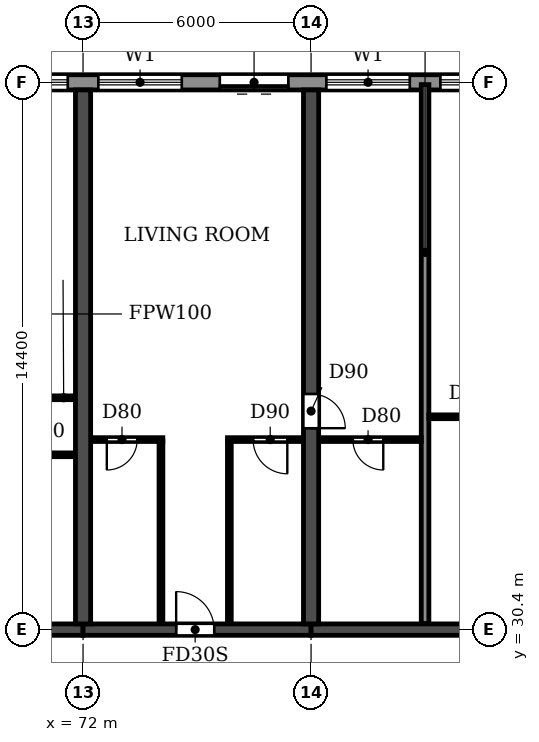
"""IFC4 building model, lengths in metres.
Left out: names, types, materials, properties, quantities, classifications, styles, units other than length and angle.
Written with IfcOpenShell. Run it as: python <this file> out.ifc"""

import sys

from ifc_helpers import new_model, si_unit, direction, frame, frame_2d, origin, place, context, subcontext, project, spatial, rectangle, extrude, element, fill, save


model = new_model("IFC4")
c1 = context("Model", 3, precision=1e-05, world=origin(), true_north=direction((0.0, 1.0)))
c2 = subcontext(c1, "Body", "Model", "MODEL_VIEW")
j1 = project(units=[si_unit("LENGTHUNIT", "METRE"), si_unit("PLANEANGLEUNIT", "RADIAN")], contexts=[c1])
p1 = place(None, origin())
s1 = spatial("IfcSite", under=j1, at=p1, CompositionType="ELEMENT")
p2 = place(p1, origin())
s2 = spatial("IfcBuilding", under=s1, at=p2, CompositionType="ELEMENT")
p3 = place(p2, frame((0.0, 0.0, 23.4)))
s3 = spatial("IfcBuildingStorey", under=s2, at=p3, CompositionType="ELEMENT", Elevation=23.4)
p4 = place(p3, frame((72.0, 30.55, 0.0), z_axis=(0.0, 0.0, 1.0), x_axis=(0.0, 1.0, 0.0)))
e1 = element("IfcWall", 1, at=p4, inside=s3, PredefinedType="SHEAR", context=c2, shape_type="SweptSolid", body=[
    extrude(rectangle(XDim=14.05, YDim=0.4, at=frame_2d((7.025, 0.0))), origin(), (0.0, 0.0, 1.0), 3.05),
])
p5 = place(p3, frame((78.0, 30.55, 0.0), z_axis=(0.0, 0.0, 1.0), x_axis=(0.0, 1.0, 0.0)))
e2 = element("IfcWall", 2, at=p5, inside=s3, PredefinedType="SHEAR", context=c2, shape_type="SweptSolid", body=[
    extrude(rectangle(XDim=14.05, YDim=0.4, at=frame_2d((7.025, 0.0))), origin(), (0.0, 0.0, 1.0), 3.05),
])
p6 = place(p5, frame((5.15, 0.0, 0.0)))
e3 = element("IfcOpeningElement", 3, at=p6, cuts=e2, PredefinedType="OPENING", context=c2, shape_type="SweptSolid", body=[
    extrude(rectangle(XDim=0.9, YDim=2.1, at=frame_2d((0.45, 1.05))), frame((0.0, 0.21, 0.0), z_axis=(0.0, -1.0, 0.0), x_axis=(1.0, 0.0, 0.0)), (0.0, 0.0, 1.0), 0.42),
])
p7 = place(p3, frame((66.0, 30.4, 0.0), z_axis=(0.0, 0.0, 1.0), x_axis=(1.0, 0.0, 0.0)))
e4 = element("IfcWall", 4, at=p7, inside=s3, PredefinedType="SHEAR", context=c2, shape_type="SweptSolid", body=[
    extrude(rectangle(XDim=6.0, YDim=0.3, at=frame_2d((3.0, 0.0))), origin(), (0.0, 0.0, 1.0), 2.45),
])
p8 = place(p3, frame((72.0, 30.4, 0.0), z_axis=(0.0, 0.0, 1.0), x_axis=(1.0, 0.0, 0.0)))
e5 = element("IfcWall", 5, at=p8, inside=s3, PredefinedType="SHEAR", context=c2, shape_type="SweptSolid", body=[
    extrude(rectangle(XDim=6.0, YDim=0.3, at=frame_2d((3.0, 0.0))), origin(), (0.0, 0.0, 1.0), 2.45),
])
p9 = place(p8, frame((2.45, 0.0, 0.0)))
e6 = element("IfcOpeningElement", 6, at=p9, cuts=e5, PredefinedType="OPENING", context=c2, shape_type="SweptSolid", body=[
    extrude(rectangle(XDim=1.0, YDim=2.1, at=frame_2d((0.5, 1.05))), frame((0.0, 0.16, 0.0), z_axis=(0.0, -1.0, 0.0), x_axis=(1.0, 0.0, 0.0)), (0.0, 0.0, 1.0), 0.32),
])
p10 = place(p3, frame((78.0, 30.4, 0.0), z_axis=(0.0, 0.0, 1.0), x_axis=(1.0, 0.0, 0.0)))
e7 = element("IfcWall", 7, at=p10, inside=s3, PredefinedType="SHEAR", context=c2, shape_type="SweptSolid", body=[
    extrude(rectangle(XDim=6.0, YDim=0.3, at=frame_2d((3.0, 0.0))), origin(), (0.0, 0.0, 1.0), 2.45),
])
p11 = place(p3, frame((97.317, 44.8, 0.0), z_axis=(0.0, 0.0, 1.0), x_axis=(-1.0, 0.0, 0.0)))
e8 = element("IfcWall", 8, at=p11, inside=s3, PredefinedType="STANDARD", context=c2, shape_type="SweptSolid", body=[
    extrude(rectangle(XDim=92.634, YDim=0.4, at=frame_2d((46.317, 0.0))), origin(), (0.0, 0.0, 1.0), 3.05),
])
p12 = place(p11, frame((88.717, 0.0, 0.9)))
e9 = element("IfcOpeningElement", 9, at=p12, cuts=e8, PredefinedType="OPENING", context=c2, shape_type="SweptSolid", body=[
    extrude(rectangle(XDim=2.2, YDim=1.5, at=frame_2d((1.1, 0.75))), frame((0.0, 0.21, 0.0), z_axis=(0.0, -1.0, 0.0), x_axis=(1.0, 0.0, 0.0)), (0.0, 0.0, 1.0), 0.42),
])
p13 = place(p11, frame((85.917, 0.0, 0.0)))
e10 = element("IfcOpeningElement", 10, at=p13, cuts=e8, PredefinedType="OPENING", context=c2, shape_type="SweptSolid", body=[
    extrude(rectangle(XDim=1.8, YDim=2.4, at=frame_2d((0.9, 1.2))), frame((0.0, 0.21, 0.0), z_axis=(0.0, -1.0, 0.0), x_axis=(1.0, 0.0, 0.0)), (0.0, 0.0, 1.0), 0.42),
])
p14 = place(p11, frame((82.717, 0.0, 0.9)))
e11 = element("IfcOpeningElement", 11, at=p14, cuts=e8, PredefinedType="OPENING", context=c2, shape_type="SweptSolid", body=[
    extrude(rectangle(XDim=2.2, YDim=1.5, at=frame_2d((1.1, 0.75))), frame((0.0, 0.21, 0.0), z_axis=(0.0, -1.0, 0.0), x_axis=(1.0, 0.0, 0.0)), (0.0, 0.0, 1.0), 0.42),
])
p15 = place(p11, frame((79.717, 0.0, 0.9)))
e12 = element("IfcOpeningElement", 12, at=p15, cuts=e8, PredefinedType="OPENING", context=c2, shape_type="SweptSolid", body=[
    extrude(rectangle(XDim=2.2, YDim=1.5, at=frame_2d((1.1, 0.75))), frame((0.0, 0.21, 0.0), z_axis=(0.0, -1.0, 0.0), x_axis=(1.0, 0.0, 0.0)), (0.0, 0.0, 1.0), 0.42),
])
p16 = place(p11, frame((76.917, 0.0, 0.0)))
e13 = element("IfcOpeningElement", 13, at=p16, cuts=e8, PredefinedType="OPENING", context=c2, shape_type="SweptSolid", body=[
    extrude(rectangle(XDim=1.8, YDim=2.4, at=frame_2d((0.9, 1.2))), frame((0.0, 0.21, 0.0), z_axis=(0.0, -1.0, 0.0), x_axis=(1.0, 0.0, 0.0)), (0.0, 0.0, 1.0), 0.42),
])
p17 = place(p11, frame((73.717, 0.0, 0.9)))
e14 = element("IfcOpeningElement", 14, at=p17, cuts=e8, PredefinedType="OPENING", context=c2, shape_type="SweptSolid", body=[
    extrude(rectangle(XDim=2.2, YDim=1.5, at=frame_2d((1.1, 0.75))), frame((0.0, 0.21, 0.0), z_axis=(0.0, -1.0, 0.0), x_axis=(1.0, 0.0, 0.0)), (0.0, 0.0, 1.0), 0.42),
])
p18 = place(p11, frame((70.717, 0.0, 0.9)))
e15 = element("IfcOpeningElement", 15, at=p18, cuts=e8, PredefinedType="OPENING", context=c2, shape_type="SweptSolid", body=[
    extrude(rectangle(XDim=2.2, YDim=1.5, at=frame_2d((1.1, 0.75))), frame((0.0, 0.21, 0.0), z_axis=(0.0, -1.0, 0.0), x_axis=(1.0, 0.0, 0.0)), (0.0, 0.0, 1.0), 0.42),
])
p19 = place(p11, frame((67.717, 0.0, 0.9)))
e16 = element("IfcOpeningElement", 16, at=p19, cuts=e8, PredefinedType="OPENING", context=c2, shape_type="SweptSolid", body=[
    extrude(rectangle(XDim=2.2, YDim=1.5, at=frame_2d((1.1, 0.75))), frame((0.0, 0.21, 0.0), z_axis=(0.0, -1.0, 0.0), x_axis=(1.0, 0.0, 0.0)), (0.0, 0.0, 1.0), 0.42),
])
p20 = place(p11, frame((64.917, 0.0, 0.0)))
e17 = element("IfcOpeningElement", 17, at=p20, cuts=e8, PredefinedType="OPENING", context=c2, shape_type="SweptSolid", body=[
    extrude(rectangle(XDim=1.8, YDim=2.4, at=frame_2d((0.9, 1.2))), frame((0.0, 0.21, 0.0), z_axis=(0.0, -1.0, 0.0), x_axis=(1.0, 0.0, 0.0)), (0.0, 0.0, 1.0), 0.42),
])
p21 = place(p11, frame((61.717, 0.0, 0.9)))
e18 = element("IfcOpeningElement", 18, at=p21, cuts=e8, PredefinedType="OPENING", context=c2, shape_type="SweptSolid", body=[
    extrude(rectangle(XDim=2.2, YDim=1.5, at=frame_2d((1.1, 0.75))), frame((0.0, 0.21, 0.0), z_axis=(0.0, -1.0, 0.0), x_axis=(1.0, 0.0, 0.0)), (0.0, 0.0, 1.0), 0.42),
])
p22 = place(p11, frame((58.717, 0.0, 0.9)))
e19 = element("IfcOpeningElement", 19, at=p22, cuts=e8, PredefinedType="OPENING", context=c2, shape_type="SweptSolid", body=[
    extrude(rectangle(XDim=2.2, YDim=1.5, at=frame_2d((1.1, 0.75))), frame((0.0, 0.21, 0.0), z_axis=(0.0, -1.0, 0.0), x_axis=(1.0, 0.0, 0.0)), (0.0, 0.0, 1.0), 0.42),
])
p23 = place(p11, frame((55.917, 0.0, 0.0)))
e20 = element("IfcOpeningElement", 20, at=p23, cuts=e8, PredefinedType="OPENING", context=c2, shape_type="SweptSolid", body=[
    extrude(rectangle(XDim=1.8, YDim=2.4, at=frame_2d((0.9, 1.2))), frame((0.0, 0.21, 0.0), z_axis=(0.0, -1.0, 0.0), x_axis=(1.0, 0.0, 0.0)), (0.0, 0.0, 1.0), 0.42),
])
p24 = place(p11, frame((52.917, 0.0, 0.0)))
e21 = element("IfcOpeningElement", 21, at=p24, cuts=e8, PredefinedType="OPENING", context=c2, shape_type="SweptSolid", body=[
    extrude(rectangle(XDim=1.8, YDim=2.4, at=frame_2d((0.9, 1.2))), frame((0.0, 0.21, 0.0), z_axis=(0.0, -1.0, 0.0), x_axis=(1.0, 0.0, 0.0)), (0.0, 0.0, 1.0), 0.42),
])
p25 = place(p11, frame((49.717, 0.0, 0.9)))
e22 = element("IfcOpeningElement", 22, at=p25, cuts=e8, PredefinedType="OPENING", context=c2, shape_type="SweptSolid", body=[
    extrude(rectangle(XDim=2.2, YDim=1.5, at=frame_2d((1.1, 0.75))), frame((0.0, 0.21, 0.0), z_axis=(0.0, -1.0, 0.0), x_axis=(1.0, 0.0, 0.0)), (0.0, 0.0, 1.0), 0.42),
])
p26 = place(p11, frame((46.917, 0.0, 0.0)))
e23 = element("IfcOpeningElement", 23, at=p26, cuts=e8, PredefinedType="OPENING", context=c2, shape_type="SweptSolid", body=[
    extrude(rectangle(XDim=1.8, YDim=2.4, at=frame_2d((0.9, 1.2))), frame((0.0, 0.21, 0.0), z_axis=(0.0, -1.0, 0.0), x_axis=(1.0, 0.0, 0.0)), (0.0, 0.0, 1.0), 0.42),
])
p27 = place(p11, frame((43.717, 0.0, 0.9)))
e24 = element("IfcOpeningElement", 24, at=p27, cuts=e8, PredefinedType="OPENING", context=c2, shape_type="SweptSolid", body=[
    extrude(rectangle(XDim=2.2, YDim=1.5, at=frame_2d((1.1, 0.75))), frame((0.0, 0.21, 0.0), z_axis=(0.0, -1.0, 0.0), x_axis=(1.0, 0.0, 0.0)), (0.0, 0.0, 1.0), 0.42),
])
p28 = place(p11, frame((40.717, 0.0, 0.9)))
e25 = element("IfcOpeningElement", 25, at=p28, cuts=e8, PredefinedType="OPENING", context=c2, shape_type="SweptSolid", body=[
    extrude(rectangle(XDim=2.2, YDim=1.5, at=frame_2d((1.1, 0.75))), frame((0.0, 0.21, 0.0), z_axis=(0.0, -1.0, 0.0), x_axis=(1.0, 0.0, 0.0)), (0.0, 0.0, 1.0), 0.42),
])
p29 = place(p11, frame((37.917, 0.0, 0.0)))
e26 = element("IfcOpeningElement", 26, at=p29, cuts=e8, PredefinedType="OPENING", context=c2, shape_type="SweptSolid", body=[
    extrude(rectangle(XDim=1.8, YDim=2.4, at=frame_2d((0.9, 1.2))), frame((0.0, 0.21, 0.0), z_axis=(0.0, -1.0, 0.0), x_axis=(1.0, 0.0, 0.0)), (0.0, 0.0, 1.0), 0.42),
])
p30 = place(p11, frame((34.917, 0.0, 0.0)))
e27 = element("IfcOpeningElement", 27, at=p30, cuts=e8, PredefinedType="OPENING", context=c2, shape_type="SweptSolid", body=[
    extrude(rectangle(XDim=1.8, YDim=2.4, at=frame_2d((0.9, 1.2))), frame((0.0, 0.21, 0.0), z_axis=(0.0, -1.0, 0.0), x_axis=(1.0, 0.0, 0.0)), (0.0, 0.0, 1.0), 0.42),
])
p31 = place(p11, frame((31.717, 0.0, 0.9)))
e28 = element("IfcOpeningElement", 28, at=p31, cuts=e8, PredefinedType="OPENING", context=c2, shape_type="SweptSolid", body=[
    extrude(rectangle(XDim=2.2, YDim=1.5, at=frame_2d((1.1, 0.75))), frame((0.0, 0.21, 0.0), z_axis=(0.0, -1.0, 0.0), x_axis=(1.0, 0.0, 0.0)), (0.0, 0.0, 1.0), 0.42),
])
p32 = place(p11, frame((28.717, 0.0, 0.9)))
e29 = element("IfcOpeningElement", 29, at=p32, cuts=e8, PredefinedType="OPENING", context=c2, shape_type="SweptSolid", body=[
    extrude(rectangle(XDim=2.2, YDim=1.5, at=frame_2d((1.1, 0.75))), frame((0.0, 0.21, 0.0), z_axis=(0.0, -1.0, 0.0), x_axis=(1.0, 0.0, 0.0)), (0.0, 0.0, 1.0), 0.42),
])
p33 = place(p11, frame((25.717, 0.0, 0.9)))
e30 = element("IfcOpeningElement", 30, at=p33, cuts=e8, PredefinedType="OPENING", context=c2, shape_type="SweptSolid", body=[
    extrude(rectangle(XDim=2.2, YDim=1.5, at=frame_2d((1.1, 0.75))), frame((0.0, 0.21, 0.0), z_axis=(0.0, -1.0, 0.0), x_axis=(1.0, 0.0, 0.0)), (0.0, 0.0, 1.0), 0.42),
])
p34 = place(p11, frame((22.717, 0.0, 0.9)))
e31 = element("IfcOpeningElement", 31, at=p34, cuts=e8, PredefinedType="OPENING", context=c2, shape_type="SweptSolid", body=[
    extrude(rectangle(XDim=2.2, YDim=1.5, at=frame_2d((1.1, 0.75))), frame((0.0, 0.21, 0.0), z_axis=(0.0, -1.0, 0.0), x_axis=(1.0, 0.0, 0.0)), (0.0, 0.0, 1.0), 0.42),
])
p35 = place(p11, frame((19.917, 0.0, 0.0)))
e32 = element("IfcOpeningElement", 32, at=p35, cuts=e8, PredefinedType="OPENING", context=c2, shape_type="SweptSolid", body=[
    extrude(rectangle(XDim=1.8, YDim=2.4, at=frame_2d((0.9, 1.2))), frame((0.0, 0.21, 0.0), z_axis=(0.0, -1.0, 0.0), x_axis=(1.0, 0.0, 0.0)), (0.0, 0.0, 1.0), 0.42),
])
p36 = place(p11, frame((16.717, 0.0, 0.9)))
e33 = element("IfcOpeningElement", 33, at=p36, cuts=e8, PredefinedType="OPENING", context=c2, shape_type="SweptSolid", body=[
    extrude(rectangle(XDim=2.2, YDim=1.5, at=frame_2d((1.1, 0.75))), frame((0.0, 0.21, 0.0), z_axis=(0.0, -1.0, 0.0), x_axis=(1.0, 0.0, 0.0)), (0.0, 0.0, 1.0), 0.42),
])
p37 = place(p11, frame((13.717, 0.0, 0.9)))
e34 = element("IfcOpeningElement", 34, at=p37, cuts=e8, PredefinedType="OPENING", context=c2, shape_type="SweptSolid", body=[
    extrude(rectangle(XDim=2.2, YDim=1.5, at=frame_2d((1.1, 0.75))), frame((0.0, 0.21, 0.0), z_axis=(0.0, -1.0, 0.0), x_axis=(1.0, 0.0, 0.0)), (0.0, 0.0, 1.0), 0.42),
])
p38 = place(p11, frame((10.717, 0.0, 0.9)))
e35 = element("IfcOpeningElement", 35, at=p38, cuts=e8, PredefinedType="OPENING", context=c2, shape_type="SweptSolid", body=[
    extrude(rectangle(XDim=2.2, YDim=1.5, at=frame_2d((1.1, 0.75))), frame((0.0, 0.21, 0.0), z_axis=(0.0, -1.0, 0.0), x_axis=(1.0, 0.0, 0.0)), (0.0, 0.0, 1.0), 0.42),
])
p39 = place(p11, frame((7.917, 0.0, 0.0)))
e36 = element("IfcOpeningElement", 36, at=p39, cuts=e8, PredefinedType="OPENING", context=c2, shape_type="SweptSolid", body=[
    extrude(rectangle(XDim=1.8, YDim=2.4, at=frame_2d((0.9, 1.2))), frame((0.0, 0.21, 0.0), z_axis=(0.0, -1.0, 0.0), x_axis=(1.0, 0.0, 0.0)), (0.0, 0.0, 1.0), 0.42),
])
p40 = place(p11, frame((4.917, 0.0, 0.0)))
e37 = element("IfcOpeningElement", 37, at=p40, cuts=e8, PredefinedType="OPENING", context=c2, shape_type="SweptSolid", body=[
    extrude(rectangle(XDim=1.8, YDim=2.4, at=frame_2d((0.9, 1.2))), frame((0.0, 0.21, 0.0), z_axis=(0.0, -1.0, 0.0), x_axis=(1.0, 0.0, 0.0)), (0.0, 0.0, 1.0), 0.42),
])
p41 = place(p11, frame((1.717, 0.0, 0.9)))
e38 = element("IfcOpeningElement", 38, at=p41, cuts=e8, PredefinedType="OPENING", context=c2, shape_type="SweptSolid", body=[
    extrude(rectangle(XDim=2.2, YDim=1.5, at=frame_2d((1.1, 0.75))), frame((0.0, 0.21, 0.0), z_axis=(0.0, -1.0, 0.0), x_axis=(1.0, 0.0, 0.0)), (0.0, 0.0, 1.0), 0.42),
])
p42 = place(p3, frame((81.0, 30.56, 0.0), z_axis=(0.0, 0.0, 1.0), x_axis=(0.0, 1.0, 0.0)))
e39 = element("IfcWall", 39, at=p42, inside=s3, PredefinedType="PARTITIONING", context=c2, shape_type="SweptSolid", body=[
    extrude(rectangle(XDim=14.18, YDim=0.2, at=frame_2d((7.09, 0.0))), origin(), (0.0, 0.0, 1.0), 3.05),
])
p43 = place(p3, frame((66.21, 35.0, 0.0), z_axis=(0.0, 0.0, 1.0), x_axis=(1.0, 0.0, 0.0)))
e40 = element("IfcWall", 40, at=p43, inside=s3, PredefinedType="PARTITIONING", context=c2, shape_type="SweptSolid", body=[
    extrude(rectangle(XDim=5.58, YDim=0.1, at=frame_2d((2.79, 0.0))), origin(), (0.0, 0.0, 1.0), 3.05),
])
p44 = place(p43, frame((1.04, 0.0, 0.0)))
e41 = element("IfcOpeningElement", 41, at=p44, cuts=e40, PredefinedType="OPENING", context=c2, shape_type="SweptSolid", body=[
    extrude(rectangle(XDim=0.8, YDim=2.1, at=frame_2d((0.4, 1.05))), frame((0.0, 0.06, 0.0), z_axis=(0.0, -1.0, 0.0), x_axis=(1.0, 0.0, 0.0)), (0.0, 0.0, 1.0), 0.12),
])
p45 = place(p43, frame((4.04, 0.0, 0.0)))
e42 = element("IfcOpeningElement", 42, at=p45, cuts=e40, PredefinedType="OPENING", context=c2, shape_type="SweptSolid", body=[
    extrude(rectangle(XDim=0.8, YDim=2.1, at=frame_2d((0.4, 1.05))), frame((0.0, 0.06, 0.0), z_axis=(0.0, -1.0, 0.0), x_axis=(1.0, 0.0, 0.0)), (0.0, 0.0, 1.0), 0.12),
])
p46 = place(p3, frame((72.21, 35.4, 0.0), z_axis=(0.0, 0.0, 1.0), x_axis=(1.0, 0.0, 0.0)))
e43 = element("IfcWall", 43, at=p46, inside=s3, PredefinedType="PARTITIONING", context=c2, shape_type="SweptSolid", body=[
    extrude(rectangle(XDim=1.89, YDim=0.1, at=frame_2d((0.945, 0.0))), origin(), (0.0, 0.0, 1.0), 3.05),
])
p47 = place(p46, frame((0.415, 0.0, 0.0)))
e44 = element("IfcOpeningElement", 44, at=p47, cuts=e43, PredefinedType="OPENING", context=c2, shape_type="SweptSolid", body=[
    extrude(rectangle(XDim=0.8, YDim=2.1, at=frame_2d((0.4, 1.05))), frame((0.0, 0.06, 0.0), z_axis=(0.0, -1.0, 0.0), x_axis=(1.0, 0.0, 0.0)), (0.0, 0.0, 1.0), 0.12),
])
p48 = place(p3, frame((75.8, 35.4, 0.0), z_axis=(0.0, 0.0, 1.0), x_axis=(1.0, 0.0, 0.0)))
e45 = element("IfcWall", 45, at=p48, inside=s3, PredefinedType="PARTITIONING", context=c2, shape_type="SweptSolid", body=[
    extrude(rectangle(XDim=1.99, YDim=0.1, at=frame_2d((0.995, 0.0))), origin(), (0.0, 0.0, 1.0), 3.05),
])
p49 = place(p48, frame((0.675, 0.0, 0.0)))
e46 = element("IfcOpeningElement", 46, at=p49, cuts=e45, PredefinedType="OPENING", context=c2, shape_type="SweptSolid", body=[
    extrude(rectangle(XDim=0.9, YDim=2.1, at=frame_2d((0.45, 1.05))), frame((0.0, 0.06, 0.0), z_axis=(0.0, -1.0, 0.0), x_axis=(1.0, 0.0, 0.0)), (0.0, 0.0, 1.0), 0.12),
])
p50 = place(p3, frame((78.21, 35.4, 0.0), z_axis=(0.0, 0.0, 1.0), x_axis=(1.0, 0.0, 0.0)))
e47 = element("IfcWall", 47, at=p50, inside=s3, PredefinedType="PARTITIONING", context=c2, shape_type="SweptSolid", body=[
    extrude(rectangle(XDim=2.69, YDim=0.1, at=frame_2d((1.345, 0.0))), origin(), (0.0, 0.0, 1.0), 3.05),
])
p51 = place(p50, frame((0.89, 0.0, 0.0)))
e48 = element("IfcOpeningElement", 48, at=p51, cuts=e47, PredefinedType="OPENING", context=c2, shape_type="SweptSolid", body=[
    extrude(rectangle(XDim=0.8, YDim=2.1, at=frame_2d((0.4, 1.05))), frame((0.0, 0.06, 0.0), z_axis=(0.0, -1.0, 0.0), x_axis=(1.0, 0.0, 0.0)), (0.0, 0.0, 1.0), 0.12),
])
p52 = place(p3, frame((81.1, 36.0, 0.0), z_axis=(0.0, 0.0, 1.0), x_axis=(1.0, 0.0, 0.0)))
e49 = element("IfcWall", 49, at=p52, inside=s3, PredefinedType="PARTITIONING", context=c2, shape_type="SweptSolid", body=[
    extrude(rectangle(XDim=2.69, YDim=0.1, at=frame_2d((1.345, 0.0))), origin(), (0.0, 0.0, 1.0), 3.05),
])
p53 = place(p52, frame((1.0, 0.0, 0.0)))
e50 = element("IfcOpeningElement", 50, at=p53, cuts=e49, PredefinedType="OPENING", context=c2, shape_type="SweptSolid", body=[
    extrude(rectangle(XDim=0.8, YDim=2.1, at=frame_2d((0.4, 1.05))), frame((0.0, 0.06, 0.0), z_axis=(0.0, -1.0, 0.0), x_axis=(1.0, 0.0, 0.0)), (0.0, 0.0, 1.0), 0.12),
])
p54 = place(p3, frame((66.21, 36.5, 0.0), z_axis=(0.0, 0.0, 1.0), x_axis=(1.0, 0.0, 0.0)))
e51 = element("IfcWall", 51, at=p54, inside=s3, PredefinedType="PARTITIONING", context=c2, shape_type="SweptSolid", body=[
    extrude(rectangle(XDim=5.58, YDim=0.1, at=frame_2d((2.79, 0.0))), origin(), (0.0, 0.0, 1.0), 3.05),
])
p55 = place(p54, frame((2.74, 0.0, 0.0)))
e52 = element("IfcOpeningElement", 52, at=p55, cuts=e51, PredefinedType="OPENING", context=c2, shape_type="SweptSolid", body=[
    extrude(rectangle(XDim=0.9, YDim=2.1, at=frame_2d((0.45, 1.05))), frame((0.0, 0.06, 0.0), z_axis=(0.0, -1.0, 0.0), x_axis=(1.0, 0.0, 0.0)), (0.0, 0.0, 1.0), 0.12),
])
for number, where, z_axis, x_axis in (
    (53, (74.05, 30.56, 0.0), (0.0, 0.0, 1.0), (0.0, 1.0, 0.0)),
    (54, (75.85, 30.56, 0.0), (0.0, 0.0, 1.0), (0.0, 1.0, 0.0)),
):
    element("IfcWall", number, at=place(p3, frame(where, z_axis=z_axis, x_axis=x_axis)), inside=s3, PredefinedType="PARTITIONING", context=c2, shape_type="SweptSolid", body=[
        extrude(rectangle(XDim=4.79, YDim=0.1, at=frame_2d((2.395, 0.0))), origin(), (0.0, 0.0, 1.0), 3.05),
    ])
p56 = place(p33, origin())
e55 = element("IfcWindow", 55, at=p56, inside=s3, PartitioningType="DOUBLE_PANEL_HORIZONTAL", PredefinedType="WINDOW", context=c2, shape_type="SweptSolid", body=[
    extrude(rectangle(XDim=2.2, YDim=1.5, at=frame_2d((1.1, 0.75))), frame((0.0, 0.03, 0.0), z_axis=(0.0, -1.0, 0.0), x_axis=(1.0, 0.0, 0.0)), (0.0, 0.0, 1.0), 0.06),
])
fill(e30, e55)
p57 = place(p34, origin())
e56 = element("IfcWindow", 56, at=p57, inside=s3, PartitioningType="DOUBLE_PANEL_HORIZONTAL", PredefinedType="WINDOW", context=c2, shape_type="SweptSolid", body=[
    extrude(rectangle(XDim=2.2, YDim=1.5, at=frame_2d((1.1, 0.75))), frame((0.0, 0.03, 0.0), z_axis=(0.0, -1.0, 0.0), x_axis=(1.0, 0.0, 0.0)), (0.0, 0.0, 1.0), 0.06),
])
fill(e31, e56)
p58 = place(p35, origin())
e57 = element("IfcDoor", 57, at=p58, inside=s3, OperationType="DOUBLE_DOOR_SLIDING", PredefinedType="DOOR", context=c2, shape_type="SweptSolid", body=[
    extrude(rectangle(XDim=1.8, YDim=2.4, at=frame_2d((0.9, 1.2))), frame((0.0, 0.025, 0.0), z_axis=(0.0, -1.0, 0.0), x_axis=(1.0, 0.0, 0.0)), (0.0, 0.0, 1.0), 0.05),
])
fill(e32, e57)
p59 = place(p36, origin())
e58 = element("IfcWindow", 58, at=p59, inside=s3, PartitioningType="DOUBLE_PANEL_HORIZONTAL", PredefinedType="WINDOW", context=c2, shape_type="SweptSolid", body=[
    extrude(rectangle(XDim=2.2, YDim=1.5, at=frame_2d((1.1, 0.75))), frame((0.0, 0.03, 0.0), z_axis=(0.0, -1.0, 0.0), x_axis=(1.0, 0.0, 0.0)), (0.0, 0.0, 1.0), 0.06),
])
fill(e33, e58)
p60 = place(p37, origin())
e59 = element("IfcWindow", 59, at=p60, inside=s3, PartitioningType="DOUBLE_PANEL_HORIZONTAL", PredefinedType="WINDOW", context=c2, shape_type="SweptSolid", body=[
    extrude(rectangle(XDim=2.2, YDim=1.5, at=frame_2d((1.1, 0.75))), frame((0.0, 0.03, 0.0), z_axis=(0.0, -1.0, 0.0), x_axis=(1.0, 0.0, 0.0)), (0.0, 0.0, 1.0), 0.06),
])
fill(e34, e59)
p61 = place(p51, frame((0.8, 0.0, 0.0), z_axis=(0.0, 0.0, 1.0), x_axis=(-1.0, 0.0, 0.0)))
e60 = element("IfcDoor", 60, at=p61, inside=s3, OperationType="SINGLE_SWING_LEFT", PredefinedType="DOOR", context=c2, shape_type="SweptSolid", body=[
    extrude(rectangle(XDim=0.8, YDim=2.1, at=frame_2d((0.4, 1.05))), frame((0.0, 0.025, 0.0), z_axis=(0.0, -1.0, 0.0), x_axis=(1.0, 0.0, 0.0)), (0.0, 0.0, 1.0), 0.05),
])
fill(e48, e60)
p62 = place(p47, frame((0.8, 0.0, 0.0), z_axis=(0.0, 0.0, 1.0), x_axis=(-1.0, 0.0, 0.0)))
e61 = element("IfcDoor", 61, at=p62, inside=s3, OperationType="SINGLE_SWING_RIGHT", PredefinedType="DOOR", context=c2, shape_type="SweptSolid", body=[
    extrude(rectangle(XDim=0.8, YDim=2.1, at=frame_2d((0.4, 1.05))), frame((0.0, 0.025, 0.0), z_axis=(0.0, -1.0, 0.0), x_axis=(1.0, 0.0, 0.0)), (0.0, 0.0, 1.0), 0.05),
])
fill(e44, e61)
p63 = place(p9, origin())
e62 = element("IfcDoor", 62, at=p63, inside=s3, OperationType="SINGLE_SWING_LEFT", PredefinedType="DOOR", context=c2, shape_type="SweptSolid", body=[
    extrude(rectangle(XDim=1.0, YDim=2.1, at=frame_2d((0.5, 1.05))), frame((0.0, 0.025, 0.0), z_axis=(0.0, -1.0, 0.0), x_axis=(1.0, 0.0, 0.0)), (0.0, 0.0, 1.0), 0.05),
])
fill(e6, e62)
p64 = place(p49, frame((0.9, 0.0, 0.0), z_axis=(0.0, 0.0, 1.0), x_axis=(-1.0, 0.0, 0.0)))
e63 = element("IfcDoor", 63, at=p64, inside=s3, OperationType="SINGLE_SWING_LEFT", PredefinedType="DOOR", context=c2, shape_type="SweptSolid", body=[
    extrude(rectangle(XDim=0.9, YDim=2.1, at=frame_2d((0.45, 1.05))), frame((0.0, 0.025, 0.0), z_axis=(0.0, -1.0, 0.0), x_axis=(1.0, 0.0, 0.0)), (0.0, 0.0, 1.0), 0.05),
])
fill(e46, e63)
p65 = place(p6, frame((0.9, 0.0, 0.0), z_axis=(0.0, 0.0, 1.0), x_axis=(-1.0, 0.0, 0.0)))
e64 = element("IfcDoor", 64, at=p65, inside=s3, OperationType="SINGLE_SWING_RIGHT", PredefinedType="DOOR", context=c2, shape_type="SweptSolid", body=[
    extrude(rectangle(XDim=0.9, YDim=2.1, at=frame_2d((0.45, 1.05))), frame((0.0, 0.025, 0.0), z_axis=(0.0, -1.0, 0.0), x_axis=(1.0, 0.0, 0.0)), (0.0, 0.0, 1.0), 0.05),
])
fill(e3, e64)
save(model, sys.argv[1])
